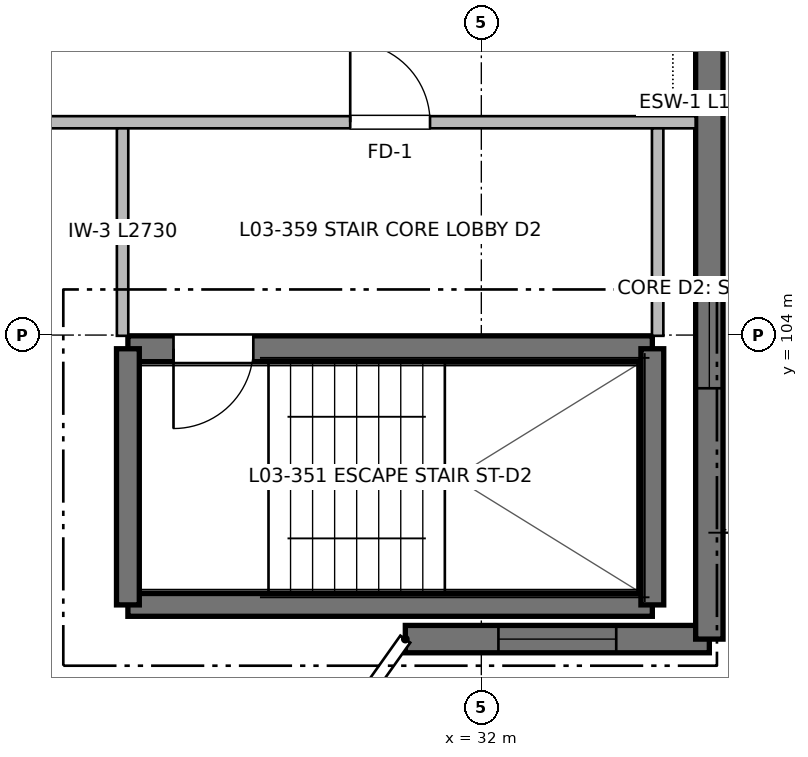
"""IFC4 building model, lengths in metres.
Left out: names, types, materials, properties, quantities, classifications, styles, units other than length and angle.
Written with IfcOpenShell. Run it as: python <this file> out.ifc"""

import sys

from ifc_helpers import new_model, si_unit, direction, frame, frame_2d, origin, place, context, subcontext, project, spatial, rectangle, extrude, element, fill, save


model = new_model("IFC4")
c1 = context("Model", 3, precision=1e-05, world=origin(), true_north=direction((0.0, 1.0)))
c2 = subcontext(c1, "Body", "Model", "MODEL_VIEW")
j1 = project(units=[si_unit("LENGTHUNIT", "METRE"), si_unit("PLANEANGLEUNIT", "RADIAN")], contexts=[c1])
p1 = place(None, origin())
s1 = spatial("IfcSite", under=j1, at=p1, CompositionType="ELEMENT")
p2 = place(p1, origin())
s2 = spatial("IfcBuilding", under=s1, at=p2, CompositionType="ELEMENT")
p3 = place(p2, frame((0.0, 0.0, 10.56)))
s3 = spatial("IfcBuildingStorey", under=s2, at=p3, CompositionType="ELEMENT", Elevation=10.56)
p4 = place(p3, frame((27.35, 100.45, 0.0), z_axis=(0.0, 0.0, 1.0), x_axis=(1.0, 0.0, 0.0)))
e1 = element("IfcWall", 1, at=p4, inside=s3, PredefinedType="SHEAR", context=c2, shape_type="SweptSolid", body=[
    extrude(rectangle(XDim=6.9, YDim=0.3, at=frame_2d((3.45, 0.0))), origin(), (0.0, 0.0, 1.0), 3.2),
])
p5 = place(p3, frame((34.25, 103.82, 0.0), z_axis=(0.0, 0.0, 1.0), x_axis=(-1.0, 0.0, 0.0)))
e2 = element("IfcWall", 2, at=p5, inside=s3, PredefinedType="SHEAR", context=c2, shape_type="SweptSolid", body=[
    extrude(rectangle(XDim=6.9, YDim=0.34, at=frame_2d((3.45, 0.0))), origin(), (0.0, 0.0, 1.0), 3.2),
])
p6 = place(p5, frame((5.25, 0.0, 0.0)))
e3 = element("IfcOpeningElement", 3, at=p6, cuts=e2, PredefinedType="OPENING", context=c2, shape_type="SweptSolid", body=[
    extrude(rectangle(XDim=1.05, YDim=2.15, at=frame_2d((0.525, 1.075))), frame((0.0, 0.18, 0.0), z_axis=(0.0, -1.0, 0.0), x_axis=(1.0, 0.0, 0.0)), (0.0, 0.0, 1.0), 0.36),
])
for number, where, z_axis, x_axis in (
    (4, (27.35, 103.82, 0.0), (0.0, 0.0, 1.0), (0.0, -1.0, 0.0)),
    (5, (34.25, 100.45, 0.0), (0.0, 0.0, 1.0), (0.0, 1.0, 0.0)),
):
    element("IfcWall", number, at=place(p3, frame(where, z_axis=z_axis, x_axis=x_axis)), inside=s3, PredefinedType="SHEAR", context=c2, shape_type="SweptSolid", body=[
        extrude(rectangle(XDim=3.37, YDim=0.3, at=frame_2d((1.685, 0.0))), origin(), (0.0, 0.0, 1.0), 3.2),
    ])
p7 = place(p3, frame((35.0, 100.0, 0.0), z_axis=(0.0, 0.0, 1.0), x_axis=(-1.0, 0.0, 0.0)))
e6 = element("IfcWall", 6, at=p7, inside=s3, PredefinedType="SHEAR", context=c2, shape_type="SweptSolid", body=[
    extrude(rectangle(XDim=4.0, YDim=0.36, at=frame_2d((2.0, 0.0))), origin(), (0.0, 0.0, 1.0), 2.98),
])
p8 = place(p7, frame((1.225, 0.0, 0.82)))
e7 = element("IfcOpeningElement", 7, at=p8, cuts=e6, PredefinedType="OPENING", context=c2, shape_type="SweptSolid", body=[
    extrude(rectangle(XDim=1.55, YDim=1.4, at=frame_2d((0.775, 0.7))), frame((0.0, 0.19, 0.0), z_axis=(0.0, -1.0, 0.0), x_axis=(1.0, 0.0, 0.0)), (0.0, 0.0, 1.0), 0.38),
])
p9 = place(p3, frame((35.0, 116.0, 0.0), z_axis=(0.0, 0.0, 1.0), x_axis=(0.0, -1.0, 0.0)))
e8 = element("IfcWall", 8, at=p9, inside=s3, PredefinedType="SHEAR", context=c2, shape_type="SweptSolid", body=[
    extrude(rectangle(XDim=16.0, YDim=0.36, at=frame_2d((8.0, 0.0))), origin(), (0.0, 0.0, 1.0), 2.98),
])
p10 = place(p9, frame((2.95, 0.0, 0.0)))
e9 = element("IfcOpeningElement", 9, at=p10, cuts=e8, PredefinedType="OPENING", context=c2, shape_type="SweptSolid", body=[
    extrude(rectangle(XDim=1.2, YDim=2.2, at=frame_2d((0.6, 1.1))), frame((0.0, 0.19, 0.0), z_axis=(0.0, -1.0, 0.0), x_axis=(1.0, 0.0, 0.0)), (0.0, 0.0, 1.0), 0.38),
])
p11 = place(p9, frame((5.3, 0.0, 0.82)))
e10 = element("IfcOpeningElement", 10, at=p11, cuts=e8, PredefinedType="OPENING", context=c2, shape_type="SweptSolid", body=[
    extrude(rectangle(XDim=1.3, YDim=1.4, at=frame_2d((0.65, 0.7))), frame((0.0, 0.19, 0.0), z_axis=(0.0, -1.0, 0.0), x_axis=(1.0, 0.0, 0.0)), (0.0, 0.0, 1.0), 0.38),
])
p12 = place(p9, frame((11.3, 0.0, 0.87)))
e11 = element("IfcOpeningElement", 11, at=p12, cuts=e8, PredefinedType="OPENING", context=c2, shape_type="SweptSolid", body=[
    extrude(rectangle(XDim=1.4, YDim=1.35, at=frame_2d((0.7, 0.675))), frame((0.0, 0.19, 0.0), z_axis=(0.0, -1.0, 0.0), x_axis=(1.0, 0.0, 0.0)), (0.0, 0.0, 1.0), 0.38),
])
p13 = place(p3, frame((17.2, 106.8, 0.0), z_axis=(0.0, 0.0, 1.0), x_axis=(1.0, 0.0, 0.0)))
e12 = element("IfcWall", 12, at=p13, inside=s3, PredefinedType="PARTITIONING", context=c2, shape_type="SweptSolid", body=[
    extrude(rectangle(XDim=17.62, YDim=0.16, at=frame_2d((8.81, 0.0))), origin(), (0.0, 0.0, 1.0), 2.935),
])
p14 = place(p13, frame((13.075, 0.0, 0.0)))
e13 = element("IfcOpeningElement", 13, at=p14, cuts=e12, PredefinedType="OPENING", context=c2, shape_type="SweptSolid", body=[
    extrude(rectangle(XDim=1.05, YDim=2.15, at=frame_2d((0.525, 1.075))), frame((0.0, 0.09, 0.0), z_axis=(0.0, -1.0, 0.0), x_axis=(1.0, 0.0, 0.0)), (0.0, 0.0, 1.0), 0.18),
])
for number, where, z_axis, x_axis in (
    (14, (27.28, 103.99, 0.0), (0.0, 0.0, 1.0), (0.0, 1.0, 0.0)),
    (15, (34.32, 103.99, 0.0), (0.0, 0.0, 1.0), (0.0, 1.0, 0.0)),
):
    element("IfcWall", number, at=place(p3, frame(where, z_axis=z_axis, x_axis=x_axis)), inside=s3, PredefinedType="PARTITIONING", context=c2, shape_type="SweptSolid", body=[
        extrude(rectangle(XDim=2.73, YDim=0.15, at=frame_2d((1.365, 0.0))), origin(), (0.0, 0.0, 1.0), 2.935),
    ])
p15 = place(p6, origin())
e16 = element("IfcDoor", 16, at=p15, inside=s3, OperationType="SINGLE_SWING_RIGHT", PredefinedType="DOOR", context=c2, shape_type="SweptSolid", body=[
    extrude(rectangle(XDim=1.05, YDim=2.15, at=frame_2d((0.525, 1.075))), frame((0.0, 0.025, 0.0), z_axis=(0.0, -1.0, 0.0), x_axis=(1.0, 0.0, 0.0)), (0.0, 0.0, 1.0), 0.05),
])
fill(e3, e16)
p16 = place(p8, origin())
e17 = element("IfcWindow", 17, at=p16, inside=s3, PartitioningType="SINGLE_PANEL", PredefinedType="WINDOW", context=c2, shape_type="SweptSolid", body=[
    extrude(rectangle(XDim=1.55, YDim=1.4, at=frame_2d((0.775, 0.7))), frame((0.0, 0.03, 0.0), z_axis=(0.0, -1.0, 0.0), x_axis=(1.0, 0.0, 0.0)), (0.0, 0.0, 1.0), 0.06),
])
fill(e7, e17)
p17 = place(p12, origin())
e18 = element("IfcWindow", 18, at=p17, inside=s3, PartitioningType="SINGLE_PANEL", PredefinedType="WINDOW", context=c2, shape_type="SweptSolid", body=[
    extrude(rectangle(XDim=1.4, YDim=1.35, at=frame_2d((0.7, 0.675))), frame((0.0, 0.03, 0.0), z_axis=(0.0, -1.0, 0.0), x_axis=(1.0, 0.0, 0.0)), (0.0, 0.0, 1.0), 0.06),
])
fill(e11, e18)
p18 = place(p14, origin())
e19 = element("IfcDoor", 19, at=p18, inside=s3, OperationType="SINGLE_SWING_LEFT", PredefinedType="DOOR", context=c2, shape_type="SweptSolid", body=[
    extrude(rectangle(XDim=1.05, YDim=2.15, at=frame_2d((0.525, 1.075))), frame((0.0, 0.025, 0.0), z_axis=(0.0, -1.0, 0.0), x_axis=(1.0, 0.0, 0.0)), (0.0, 0.0, 1.0), 0.05),
])
fill(e13, e19)
save(model, sys.argv[1])
